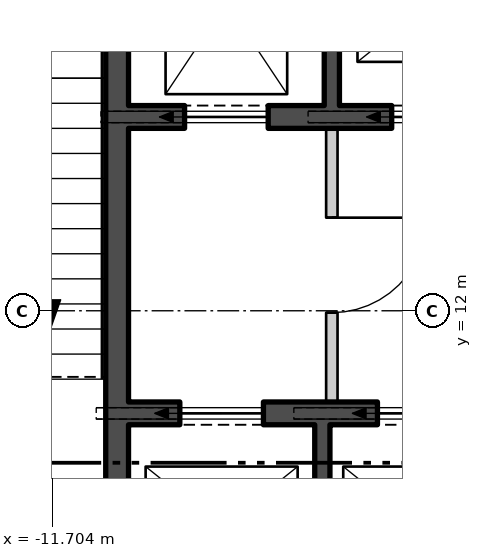
"""IFC4 building model, lengths in metres.
Left out: names, types, materials, properties, quantities, classifications, styles, units other than length and angle.
Written with IfcOpenShell. Run it as: python <this file> out.ifc"""

import sys

from ifc_helpers import new_model, si_unit, direction, frame, frame_2d, origin, place, context, subcontext, project, spatial, polyline, rectangle, outline, extrude, element, fill, save


model = new_model("IFC4")
c1 = context("Model", 3, precision=1e-05, world=origin(), true_north=direction((0.0, 1.0)))
c2 = subcontext(c1, "Body", "Model", "MODEL_VIEW")
j1 = project(units=[si_unit("LENGTHUNIT", "METRE"), si_unit("PLANEANGLEUNIT", "RADIAN")], contexts=[c1])
p1 = place(None, origin())
s1 = spatial("IfcSite", under=j1, at=p1, CompositionType="ELEMENT")
p2 = place(p1, origin())
s2 = spatial("IfcBuilding", under=s1, at=p2, CompositionType="ELEMENT")
p3 = place(p2, frame((0.0, 0.0, 192.6)))
s3 = spatial("IfcBuildingStorey", under=s2, at=p3, CompositionType="ELEMENT", Elevation=192.6)
p4 = place(p3, frame((-26.54, 13.618, -0.18), z_axis=(0.0, 0.0, 1.0), x_axis=(0.499999764979, -0.866025539474, 0.0)))
e1 = element("IfcWall", 1, at=p4, inside=s3, PredefinedType="SOLIDWALL", context=c2, shape_type="SweptSolid", body=[
    extrude(outline(polyline([(-0.13, -0.225), (45.87, -0.225), (45.61, 0.225), (0.13, 0.225), (-0.13, -0.225)])), origin(), (0.0, 0.0, 1.0), 3.68),
])
p5 = place(p4, frame((1.424, 0.0, 1.08)))
e2 = element("IfcOpeningElement", 2, at=p5, cuts=e1, PredefinedType="OPENING", context=c2, shape_type="SweptSolid", body=[
    extrude(rectangle(XDim=2.4, YDim=2.0, at=frame_2d((1.2, 1.0))), frame((0.0, 0.235, 0.0), z_axis=(0.0, -1.0, 0.0), x_axis=(1.0, 0.0, 0.0)), (0.0, 0.0, 1.0), 0.47),
])
p6 = place(p4, frame((5.893, 0.0, 1.08)))
e3 = element("IfcOpeningElement", 3, at=p6, cuts=e1, PredefinedType="OPENING", context=c2, shape_type="SweptSolid", body=[
    extrude(rectangle(XDim=2.4, YDim=2.0, at=frame_2d((1.2, 1.0))), frame((0.0, 0.235, 0.0), z_axis=(0.0, -1.0, 0.0), x_axis=(1.0, 0.0, 0.0)), (0.0, 0.0, 1.0), 0.47),
])
p7 = place(p4, frame((10.401, 0.0, 1.08)))
e4 = element("IfcOpeningElement", 4, at=p7, cuts=e1, PredefinedType="OPENING", context=c2, shape_type="SweptSolid", body=[
    extrude(rectangle(XDim=2.4, YDim=2.0, at=frame_2d((1.2, 1.0))), frame((0.0, 0.235, 0.0), z_axis=(0.0, -1.0, 0.0), x_axis=(1.0, 0.0, 0.0)), (0.0, 0.0, 1.0), 0.47),
])
p8 = place(p4, frame((14.909, 0.0, 1.08)))
e5 = element("IfcOpeningElement", 5, at=p8, cuts=e1, PredefinedType="OPENING", context=c2, shape_type="SweptSolid", body=[
    extrude(rectangle(XDim=2.4, YDim=2.0, at=frame_2d((1.2, 1.0))), frame((0.0, 0.235, 0.0), z_axis=(0.0, -1.0, 0.0), x_axis=(1.0, 0.0, 0.0)), (0.0, 0.0, 1.0), 0.47),
])
p9 = place(p4, frame((19.416, 0.0, 1.08)))
e6 = element("IfcOpeningElement", 6, at=p9, cuts=e1, PredefinedType="OPENING", context=c2, shape_type="SweptSolid", body=[
    extrude(rectangle(XDim=2.4, YDim=2.0, at=frame_2d((1.2, 1.0))), frame((0.0, 0.235, 0.0), z_axis=(0.0, -1.0, 0.0), x_axis=(1.0, 0.0, 0.0)), (0.0, 0.0, 1.0), 0.47),
])
p10 = place(p4, frame((23.924, 0.0, 1.08)))
e7 = element("IfcOpeningElement", 7, at=p10, cuts=e1, PredefinedType="OPENING", context=c2, shape_type="SweptSolid", body=[
    extrude(rectangle(XDim=2.4, YDim=2.0, at=frame_2d((1.2, 1.0))), frame((0.0, 0.235, 0.0), z_axis=(0.0, -1.0, 0.0), x_axis=(1.0, 0.0, 0.0)), (0.0, 0.0, 1.0), 0.47),
])
p11 = place(p4, frame((28.431, 0.0, 1.08)))
e8 = element("IfcOpeningElement", 8, at=p11, cuts=e1, PredefinedType="OPENING", context=c2, shape_type="SweptSolid", body=[
    extrude(rectangle(XDim=2.4, YDim=2.0, at=frame_2d((1.2, 1.0))), frame((0.0, 0.235, 0.0), z_axis=(0.0, -1.0, 0.0), x_axis=(1.0, 0.0, 0.0)), (0.0, 0.0, 1.0), 0.47),
])
p12 = place(p4, frame((32.939, 0.0, 1.08)))
e9 = element("IfcOpeningElement", 9, at=p12, cuts=e1, PredefinedType="OPENING", context=c2, shape_type="SweptSolid", body=[
    extrude(rectangle(XDim=2.4, YDim=2.0, at=frame_2d((1.2, 1.0))), frame((0.0, 0.235, 0.0), z_axis=(0.0, -1.0, 0.0), x_axis=(1.0, 0.0, 0.0)), (0.0, 0.0, 1.0), 0.47),
])
p13 = place(p4, frame((41.916, 0.0, 1.08)))
e10 = element("IfcOpeningElement", 10, at=p13, cuts=e1, PredefinedType="OPENING", context=c2, shape_type="SweptSolid", body=[
    extrude(rectangle(XDim=2.4, YDim=2.0, at=frame_2d((1.2, 1.0))), frame((0.0, 0.235, 0.0), z_axis=(0.0, -1.0, 0.0), x_axis=(1.0, 0.0, 0.0)), (0.0, 0.0, 1.0), 0.47),
])
p14 = place(p3, frame((-10.85, 2.45, 0.0), z_axis=(0.0, 0.0, 1.0), x_axis=(0.0, 1.0, 0.0)))
e11 = element("IfcWall", 11, at=p14, inside=s3, PredefinedType="SHEAR", context=c2, shape_type="SweptSolid", body=[
    extrude(rectangle(XDim=15.1, YDim=0.3, at=frame_2d((7.55, 0.0))), origin(), (0.0, 0.0, 1.0), 3.7),
])
p15 = place(p14, frame((3.525, 0.0, 0.0)))
e12 = element("IfcOpeningElement", 12, at=p15, cuts=e11, PredefinedType="OPENING", context=c2, shape_type="SweptSolid", body=[
    extrude(rectangle(XDim=1.25, YDim=2.1, at=frame_2d((0.625, 1.05))), frame((0.0, 0.16, 0.0), z_axis=(0.0, -1.0, 0.0), x_axis=(1.0, 0.0, 0.0)), (0.0, 0.0, 1.0), 0.32),
])
p16 = place(p14, frame((1.15, 0.0, 0.0)))
e13 = element("IfcOpeningElement", 13, at=p16, cuts=e11, PredefinedType="OPENING", context=c2, shape_type="SweptSolid", body=[
    extrude(rectangle(XDim=1.0, YDim=2.1, at=frame_2d((0.5, 1.05))), frame((0.0, 0.16, 0.0), z_axis=(0.0, -1.0, 0.0), x_axis=(1.0, 0.0, 0.0)), (0.0, 0.0, 1.0), 0.32),
])
p17 = place(p3, frame((-10.7, 14.55, 0.0), z_axis=(0.0, 0.0, 1.0), x_axis=(1.0, 0.0, 0.0)))
e14 = element("IfcWall", 14, at=p17, inside=s3, PredefinedType="SHEAR", context=c2, shape_type="SweptSolid", body=[
    extrude(rectangle(XDim=21.4, YDim=0.3, at=frame_2d((10.7, 0.0))), origin(), (0.0, 0.0, 1.0), 3.7),
])
p18 = place(p17, frame((0.738, 0.0, 0.0)))
e15 = element("IfcOpeningElement", 15, at=p18, cuts=e14, PredefinedType="OPENING", context=c2, shape_type="SweptSolid", body=[
    extrude(rectangle(XDim=1.1, YDim=2.1, at=frame_2d((0.55, 1.05))), frame((0.0, 0.16, 0.0), z_axis=(0.0, -1.0, 0.0), x_axis=(1.0, 0.0, 0.0)), (0.0, 0.0, 1.0), 0.32),
])
p19 = place(p17, frame((3.462, 0.0, 0.0)))
e16 = element("IfcOpeningElement", 16, at=p19, cuts=e14, PredefinedType="OPENING", context=c2, shape_type="SweptSolid", body=[
    extrude(rectangle(XDim=1.1, YDim=2.1, at=frame_2d((0.55, 1.05))), frame((0.0, 0.16, 0.0), z_axis=(0.0, -1.0, 0.0), x_axis=(1.0, 0.0, 0.0)), (0.0, 0.0, 1.0), 0.32),
])
p20 = place(p17, frame((6.138, 0.0, 0.0)))
e17 = element("IfcOpeningElement", 17, at=p20, cuts=e14, PredefinedType="OPENING", context=c2, shape_type="SweptSolid", body=[
    extrude(rectangle(XDim=1.1, YDim=2.1, at=frame_2d((0.55, 1.05))), frame((0.0, 0.16, 0.0), z_axis=(0.0, -1.0, 0.0), x_axis=(1.0, 0.0, 0.0)), (0.0, 0.0, 1.0), 0.32),
])
p21 = place(p17, frame((8.812, 0.0, 0.0)))
e18 = element("IfcOpeningElement", 18, at=p21, cuts=e14, PredefinedType="OPENING", context=c2, shape_type="SweptSolid", body=[
    extrude(rectangle(XDim=1.1, YDim=2.1, at=frame_2d((0.55, 1.05))), frame((0.0, 0.16, 0.0), z_axis=(0.0, -1.0, 0.0), x_axis=(1.0, 0.0, 0.0)), (0.0, 0.0, 1.0), 0.32),
])
p22 = place(p17, frame((19.562, 0.0, 0.0)))
e19 = element("IfcOpeningElement", 19, at=p22, cuts=e14, PredefinedType="OPENING", context=c2, shape_type="SweptSolid", body=[
    extrude(rectangle(XDim=1.1, YDim=2.1, at=frame_2d((0.55, 1.05))), frame((0.0, 0.16, 0.0), z_axis=(0.0, -1.0, 0.0), x_axis=(1.0, 0.0, 0.0)), (0.0, 0.0, 1.0), 0.32),
])
p23 = place(p17, frame((11.537, 0.0, 0.0)))
e20 = element("IfcOpeningElement", 20, at=p23, cuts=e14, PredefinedType="OPENING", context=c2, shape_type="SweptSolid", body=[
    extrude(rectangle(XDim=1.0, YDim=2.1, at=frame_2d((0.5, 1.05))), frame((0.0, 0.16, 0.0), z_axis=(0.0, -1.0, 0.0), x_axis=(1.0, 0.0, 0.0)), (0.0, 0.0, 1.0), 0.32),
])
p24 = place(p17, frame((14.213, 0.0, 0.0)))
e21 = element("IfcOpeningElement", 21, at=p24, cuts=e14, PredefinedType="OPENING", context=c2, shape_type="SweptSolid", body=[
    extrude(rectangle(XDim=1.0, YDim=2.1, at=frame_2d((0.5, 1.05))), frame((0.0, 0.16, 0.0), z_axis=(0.0, -1.0, 0.0), x_axis=(1.0, 0.0, 0.0)), (0.0, 0.0, 1.0), 0.32),
])
p25 = place(p17, frame((16.887, 0.0, 0.0)))
e22 = element("IfcOpeningElement", 22, at=p25, cuts=e14, PredefinedType="OPENING", context=c2, shape_type="SweptSolid", body=[
    extrude(rectangle(XDim=1.0, YDim=2.1, at=frame_2d((0.5, 1.05))), frame((0.0, 0.16, 0.0), z_axis=(0.0, -1.0, 0.0), x_axis=(1.0, 0.0, 0.0)), (0.0, 0.0, 1.0), 0.32),
])
p26 = place(p3, frame((-10.7, 10.65, 0.0), z_axis=(0.0, 0.0, 1.0), x_axis=(1.0, 0.0, 0.0)))
e23 = element("IfcWall", 23, at=p26, inside=s3, PredefinedType="SHEAR", context=c2, shape_type="SweptSolid", body=[
    extrude(rectangle(XDim=10.3, YDim=0.3, at=frame_2d((5.15, 0.0))), origin(), (0.0, 0.0, 1.0), 3.7),
])
p27 = place(p26, frame((0.675, 0.0, 0.0)))
e24 = element("IfcOpeningElement", 24, at=p27, cuts=e23, PredefinedType="OPENING", context=c2, shape_type="SweptSolid", body=[
    extrude(rectangle(XDim=1.1, YDim=2.1, at=frame_2d((0.55, 1.05))), frame((0.0, 0.16, 0.0), z_axis=(0.0, -1.0, 0.0), x_axis=(1.0, 0.0, 0.0)), (0.0, 0.0, 1.0), 0.32),
])
p28 = place(p26, frame((3.275, 0.0, 0.0)))
e25 = element("IfcOpeningElement", 25, at=p28, cuts=e23, PredefinedType="OPENING", context=c2, shape_type="SweptSolid", body=[
    extrude(rectangle(XDim=1.1, YDim=2.1, at=frame_2d((0.55, 1.05))), frame((0.0, 0.16, 0.0), z_axis=(0.0, -1.0, 0.0), x_axis=(1.0, 0.0, 0.0)), (0.0, 0.0, 1.0), 0.32),
])
p29 = place(p26, frame((5.825, 0.0, 0.0)))
e26 = element("IfcOpeningElement", 26, at=p29, cuts=e23, PredefinedType="OPENING", context=c2, shape_type="SweptSolid", body=[
    extrude(rectangle(XDim=1.1, YDim=2.1, at=frame_2d((0.55, 1.05))), frame((0.0, 0.16, 0.0), z_axis=(0.0, -1.0, 0.0), x_axis=(1.0, 0.0, 0.0)), (0.0, 0.0, 1.0), 0.32),
])
p30 = place(p26, frame((8.425, 0.0, 0.0)))
e27 = element("IfcOpeningElement", 27, at=p30, cuts=e23, PredefinedType="OPENING", context=c2, shape_type="SweptSolid", body=[
    extrude(rectangle(XDim=1.0, YDim=2.1, at=frame_2d((0.5, 1.05))), frame((0.0, 0.16, 0.0), z_axis=(0.0, -1.0, 0.0), x_axis=(1.0, 0.0, 0.0)), (0.0, 0.0, 1.0), 0.32),
])
p31 = place(p3, frame((-8.025, 14.7, 0.0), z_axis=(0.0, 0.0, 1.0), x_axis=(0.0, 1.0, 0.0)))
e28 = element("IfcWall", 28, at=p31, inside=s3, PredefinedType="SHEAR", context=c2, shape_type="SweptSolid", body=[
    extrude(rectangle(XDim=2.85, YDim=0.2, at=frame_2d((1.425, 0.0))), origin(), (0.0, 0.0, 1.0), 3.7),
])
p32 = place(p3, frame((-8.15, 7.8, 0.0), z_axis=(0.0, 0.0, 1.0), x_axis=(0.0, 1.0, 0.0)))
e29 = element("IfcWall", 29, at=p32, inside=s3, PredefinedType="SHEAR", context=c2, shape_type="SweptSolid", body=[
    extrude(rectangle(XDim=2.7, YDim=0.2, at=frame_2d((1.35, 0.0))), origin(), (0.0, 0.0, 1.0), 3.7),
])
p33 = place(p3, frame((-8.025, 10.8, 0.0), z_axis=(0.0, 0.0, 1.0), x_axis=(0.0, 1.0, 0.0)))
e30 = element("IfcWall", 30, at=p33, inside=s3, PredefinedType="PARTITIONING", context=c2, shape_type="SweptSolid", body=[
    extrude(rectangle(XDim=3.6, YDim=0.15, at=frame_2d((1.8, 0.0))), origin(), (0.0, 0.0, 1.0), 3.7),
])
p34 = place(p33, frame((1.175, 0.0, 0.0)))
e31 = element("IfcOpeningElement", 31, at=p34, cuts=e30, PredefinedType="OPENING", context=c2, shape_type="SweptSolid", body=[
    extrude(rectangle(XDim=1.25, YDim=2.1, at=frame_2d((0.625, 1.05))), frame((0.0, 0.085, 0.0), z_axis=(0.0, -1.0, 0.0), x_axis=(1.0, 0.0, 0.0)), (0.0, 0.0, 1.0), 0.17),
])
p35 = place(p18, origin())
e32 = element("IfcDoor", 32, at=p35, inside=s3, OperationType="SLIDING_TO_LEFT", PredefinedType="DOOR", context=c2, shape_type="SweptSolid", body=[
    extrude(rectangle(XDim=1.1, YDim=2.1, at=frame_2d((0.55, 1.05))), frame((0.0, 0.025, 0.0), z_axis=(0.0, -1.0, 0.0), x_axis=(1.0, 0.0, 0.0)), (0.0, 0.0, 1.0), 0.05),
])
fill(e15, e32)
p36 = place(p19, origin())
e33 = element("IfcDoor", 33, at=p36, inside=s3, OperationType="SLIDING_TO_LEFT", PredefinedType="DOOR", context=c2, shape_type="SweptSolid", body=[
    extrude(rectangle(XDim=1.1, YDim=2.1, at=frame_2d((0.55, 1.05))), frame((0.0, 0.025, 0.0), z_axis=(0.0, -1.0, 0.0), x_axis=(1.0, 0.0, 0.0)), (0.0, 0.0, 1.0), 0.05),
])
fill(e16, e33)
p37 = place(p27, origin())
e34 = element("IfcDoor", 34, at=p37, inside=s3, OperationType="SLIDING_TO_LEFT", PredefinedType="DOOR", context=c2, shape_type="SweptSolid", body=[
    extrude(rectangle(XDim=1.1, YDim=2.1, at=frame_2d((0.55, 1.05))), frame((0.0, 0.025, 0.0), z_axis=(0.0, -1.0, 0.0), x_axis=(1.0, 0.0, 0.0)), (0.0, 0.0, 1.0), 0.05),
])
fill(e24, e34)
p38 = place(p28, origin())
e35 = element("IfcDoor", 35, at=p38, inside=s3, OperationType="SLIDING_TO_LEFT", PredefinedType="DOOR", context=c2, shape_type="SweptSolid", body=[
    extrude(rectangle(XDim=1.1, YDim=2.1, at=frame_2d((0.55, 1.05))), frame((0.0, 0.025, 0.0), z_axis=(0.0, -1.0, 0.0), x_axis=(1.0, 0.0, 0.0)), (0.0, 0.0, 1.0), 0.05),
])
fill(e25, e35)
p39 = place(p34, origin())
e36 = element("IfcDoor", 36, at=p39, inside=s3, OperationType="SINGLE_SWING_RIGHT", PredefinedType="DOOR", context=c2, shape_type="SweptSolid", body=[
    extrude(rectangle(XDim=1.25, YDim=2.1, at=frame_2d((0.625, 1.05))), frame((0.0, 0.025, 0.0), z_axis=(0.0, -1.0, 0.0), x_axis=(1.0, 0.0, 0.0)), (0.0, 0.0, 1.0), 0.05),
])
fill(e31, e36)
save(model, sys.argv[1])
